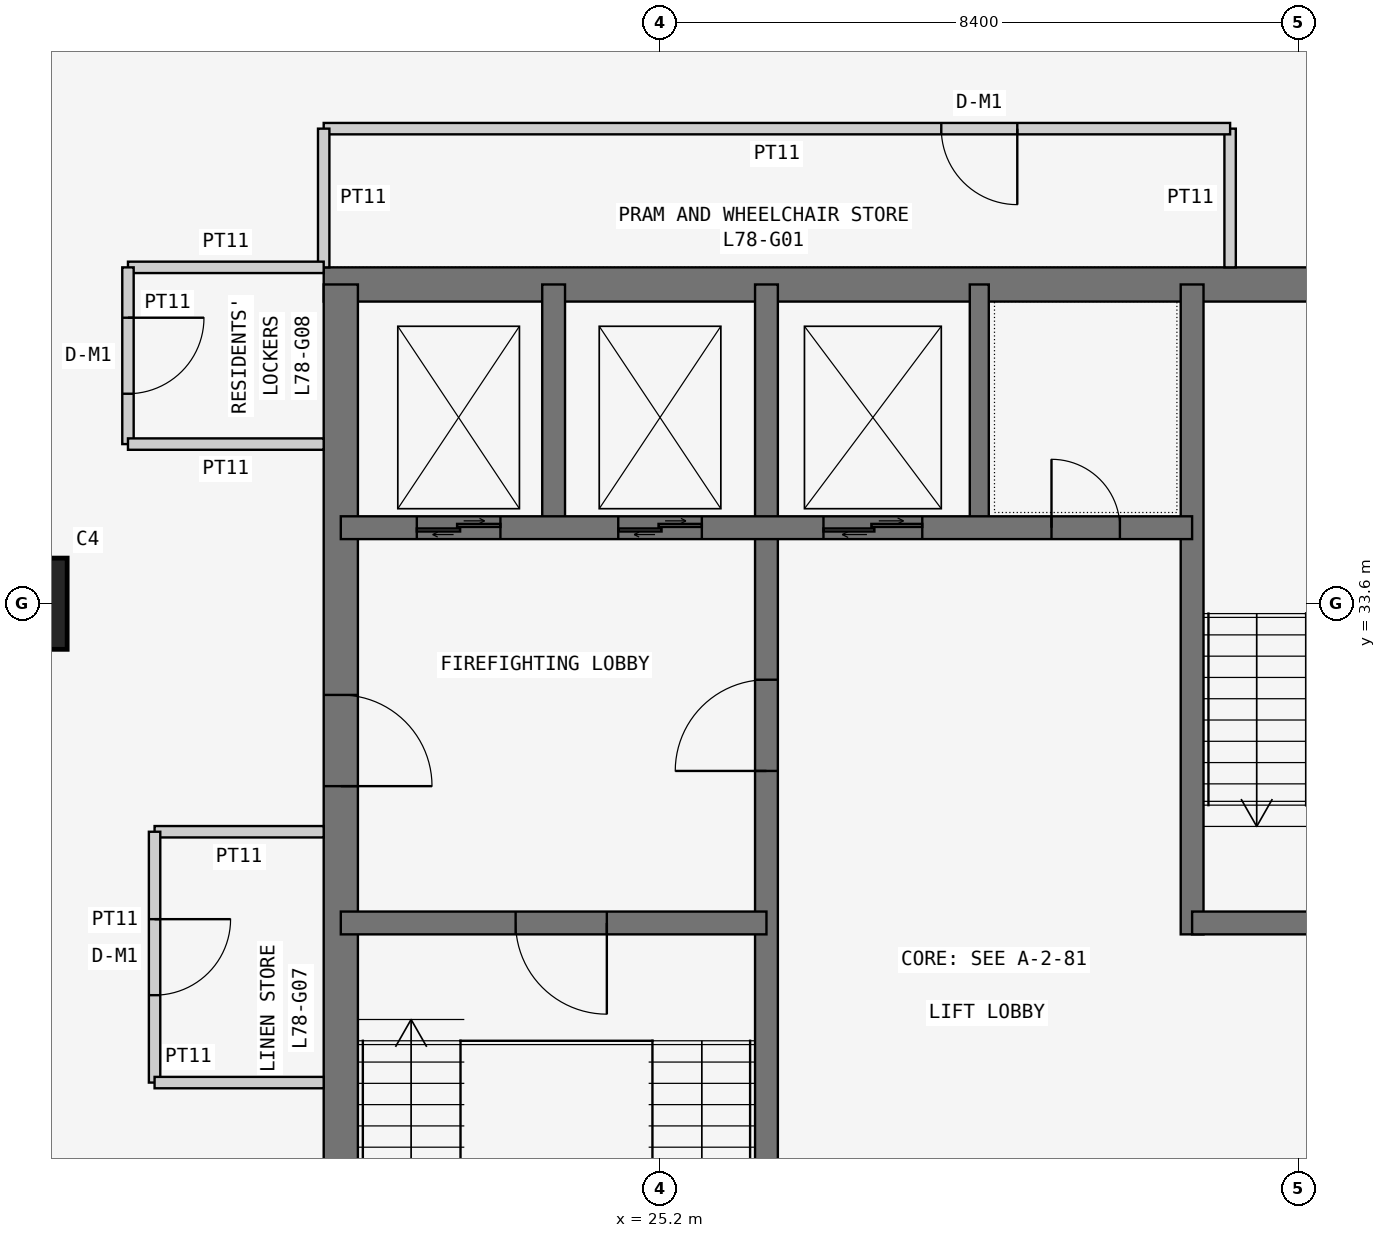
"""IFC4 building model, lengths in metres.
Left out: names, types, materials, properties, quantities, classifications, styles, units other than length and angle.
Written with IfcOpenShell. Run it as: python <this file> out.ifc"""

import sys

from ifc_helpers import new_model, si_unit, direction, frame, frame_2d, origin, origin_2d, place, context, subcontext, project, spatial, rectangle, extrude, element, fill, save


model = new_model("IFC4")
c1 = context("Model", 3, precision=1e-05, world=origin(), true_north=direction((0.0, 1.0)))
c2 = subcontext(c1, "Body", "Model", "MODEL_VIEW")
j1 = project(units=[si_unit("LENGTHUNIT", "METRE"), si_unit("PLANEANGLEUNIT", "RADIAN")], contexts=[c1])
p1 = place(None, origin())
s1 = spatial("IfcSite", under=j1, at=p1, CompositionType="ELEMENT")
p2 = place(p1, origin())
s2 = spatial("IfcBuilding", under=s1, at=p2, CompositionType="ELEMENT")
p3 = place(p2, frame((0.0, 0.0, 297.3)))
s3 = spatial("IfcBuildingStorey", under=s2, at=p3, CompositionType="ELEMENT", Elevation=297.3)
p4 = place(p3, frame((16.8, 33.6, 0.0), z_axis=(0.0, 0.0, 1.0), x_axis=(1.0, 0.0, 0.0)))
e1 = element("IfcColumn", 1, at=p4, inside=s3, PredefinedType="COLUMN", context=c2, shape_type="SweptSolid", body=[
    extrude(rectangle(XDim=1.2, YDim=1.2, at=origin_2d()), origin(), (0.0, 0.0, 1.0), 3.6),
])
p5 = place(p3, frame((37.8, 37.8, 0.0), z_axis=(0.0, 0.0, 1.0), x_axis=(-1.0, 0.0, 0.0)))
e2 = element("IfcWall", 2, at=p5, inside=s3, PredefinedType="SHEAR", context=c2, shape_type="SweptSolid", body=[
    extrude(rectangle(XDim=17.025, YDim=0.45, at=frame_2d((8.513, 0.0))), origin(), (0.0, 0.0, 1.0), 3.6),
])
p6 = place(p3, frame((21.0, 37.8, 0.0), z_axis=(0.0, 0.0, 1.0), x_axis=(0.0, -1.0, 0.0)))
e3 = element("IfcWall", 3, at=p6, inside=s3, PredefinedType="SHEAR", context=c2, shape_type="SweptSolid", body=[
    extrude(rectangle(XDim=17.025, YDim=0.45, at=frame_2d((8.513, 0.0))), origin(), (0.0, 0.0, 1.0), 3.6),
])
p7 = place(p6, frame((5.4, 0.0, 0.0)))
e4 = element("IfcOpeningElement", 4, at=p7, cuts=e3, PredefinedType="OPENING", context=c2, shape_type="SweptSolid", body=[
    extrude(rectangle(XDim=1.2, YDim=2.1, at=frame_2d((0.6, 1.05))), frame((0.0, 0.235, 0.0), z_axis=(0.0, -1.0, 0.0), x_axis=(1.0, 0.0, 0.0)), (0.0, 0.0, 1.0), 0.47),
])
p8 = place(p3, frame((26.6, 21.0, 0.0), z_axis=(0.0, 0.0, 1.0), x_axis=(0.0, 1.0, 0.0)))
e5 = element("IfcWall", 5, at=p8, inside=s3, PredefinedType="SHEAR", context=c2, shape_type="SweptSolid", body=[
    extrude(rectangle(XDim=16.8, YDim=0.3, at=frame_2d((8.4, 0.0))), origin(), (0.0, 0.0, 1.0), 3.6),
])
p9 = place(p8, frame((10.4, 0.0, 0.0)))
e6 = element("IfcOpeningElement", 6, at=p9, cuts=e5, PredefinedType="OPENING", context=c2, shape_type="SweptSolid", body=[
    extrude(rectangle(XDim=1.2, YDim=2.1, at=frame_2d((0.6, 1.05))), frame((0.0, 0.16, 0.0), z_axis=(0.0, -1.0, 0.0), x_axis=(1.0, 0.0, 0.0)), (0.0, 0.0, 1.0), 0.32),
])
p10 = place(p3, frame((21.0, 29.4, 0.0), z_axis=(0.0, 0.0, 1.0), x_axis=(1.0, 0.0, 0.0)))
e7 = element("IfcWall", 7, at=p10, inside=s3, PredefinedType="SHEAR", context=c2, shape_type="SweptSolid", body=[
    extrude(rectangle(XDim=5.6, YDim=0.3, at=frame_2d((2.8, 0.0))), origin(), (0.0, 0.0, 1.0), 3.6),
])
p11 = place(p10, frame((2.3, 0.0, 0.0)))
e8 = element("IfcOpeningElement", 8, at=p11, cuts=e7, PredefinedType="OPENING", context=c2, shape_type="SweptSolid", body=[
    extrude(rectangle(XDim=1.2, YDim=2.1, at=frame_2d((0.6, 1.05))), frame((0.0, 0.16, 0.0), z_axis=(0.0, -1.0, 0.0), x_axis=(1.0, 0.0, 0.0)), (0.0, 0.0, 1.0), 0.32),
])
p12 = place(p3, frame((21.0, 34.6, 0.0), z_axis=(0.0, 0.0, 1.0), x_axis=(1.0, 0.0, 0.0)))
e9 = element("IfcWall", 9, at=p12, inside=s3, PredefinedType="SHEAR", context=c2, shape_type="SweptSolid", body=[
    extrude(rectangle(XDim=11.2, YDim=0.3, at=frame_2d((5.6, 0.0))), origin(), (0.0, 0.0, 1.0), 3.6),
])
p13 = place(p12, frame((9.35, 0.0, 0.0)))
e10 = element("IfcOpeningElement", 10, at=p13, cuts=e9, PredefinedType="OPENING", context=c2, shape_type="SweptSolid", body=[
    extrude(rectangle(XDim=0.9, YDim=2.1, at=frame_2d((0.45, 1.05))), frame((0.0, 0.16, 0.0), z_axis=(0.0, -1.0, 0.0), x_axis=(1.0, 0.0, 0.0)), (0.0, 0.0, 1.0), 0.32),
])
p14 = place(p12, frame((1.0, 0.0, 0.0)))
e11 = element("IfcOpeningElement", 11, at=p14, cuts=e9, PredefinedType="OPENING", context=c2, shape_type="SweptSolid", body=[
    extrude(rectangle(XDim=1.1, YDim=2.1, at=frame_2d((0.55, 1.05))), frame((0.0, 0.16, 0.0), z_axis=(0.0, -1.0, 0.0), x_axis=(1.0, 0.0, 0.0)), (0.0, 0.0, 1.0), 0.32),
])
p15 = place(p12, frame((3.65, 0.0, 0.0)))
e12 = element("IfcOpeningElement", 12, at=p15, cuts=e9, PredefinedType="OPENING", context=c2, shape_type="SweptSolid", body=[
    extrude(rectangle(XDim=1.1, YDim=2.1, at=frame_2d((0.55, 1.05))), frame((0.0, 0.16, 0.0), z_axis=(0.0, -1.0, 0.0), x_axis=(1.0, 0.0, 0.0)), (0.0, 0.0, 1.0), 0.32),
])
p16 = place(p12, frame((6.35, 0.0, 0.0)))
e13 = element("IfcOpeningElement", 13, at=p16, cuts=e9, PredefinedType="OPENING", context=c2, shape_type="SweptSolid", body=[
    extrude(rectangle(XDim=1.3, YDim=2.1, at=frame_2d((0.65, 1.05))), frame((0.0, 0.16, 0.0), z_axis=(0.0, -1.0, 0.0), x_axis=(1.0, 0.0, 0.0)), (0.0, 0.0, 1.0), 0.32),
])
p17 = place(p3, frame((23.8, 34.6, 0.0), z_axis=(0.0, 0.0, 1.0), x_axis=(0.0, 1.0, 0.0)))
e14 = element("IfcWall", 14, at=p17, inside=s3, PredefinedType="SHEAR", context=c2, shape_type="SweptSolid", body=[
    extrude(rectangle(XDim=3.2, YDim=0.3, at=frame_2d((1.6, 0.0))), origin(), (0.0, 0.0, 1.0), 3.6),
])
p18 = place(p3, frame((32.2, 29.25, 0.0), z_axis=(0.0, 0.0, 1.0), x_axis=(0.0, 1.0, 0.0)))
e15 = element("IfcWall", 15, at=p18, inside=s3, PredefinedType="SHEAR", context=c2, shape_type="SweptSolid", body=[
    extrude(rectangle(XDim=8.55, YDim=0.3, at=frame_2d((4.275, 0.0))), origin(), (0.0, 0.0, 1.0), 3.6),
])
p19 = place(p3, frame((32.2, 29.4, 0.0), z_axis=(0.0, 0.0, 1.0), x_axis=(1.0, 0.0, 0.0)))
e16 = element("IfcWall", 16, at=p19, inside=s3, PredefinedType="SHEAR", context=c2, shape_type="SweptSolid", body=[
    extrude(rectangle(XDim=5.6, YDim=0.3, at=frame_2d((2.8, 0.0))), origin(), (0.0, 0.0, 1.0), 3.6),
])
p20 = place(p19, frame((2.0, 0.0, 0.0)))
e17 = element("IfcOpeningElement", 17, at=p20, cuts=e16, PredefinedType="OPENING", context=c2, shape_type="SweptSolid", body=[
    extrude(rectangle(XDim=1.2, YDim=2.1, at=frame_2d((0.6, 1.05))), frame((0.0, 0.16, 0.0), z_axis=(0.0, -1.0, 0.0), x_axis=(1.0, 0.0, 0.0)), (0.0, 0.0, 1.0), 0.32),
])
p21 = place(p3, frame((29.4, 34.6, 0.0), z_axis=(0.0, 0.0, 1.0), x_axis=(0.0, 1.0, 0.0)))
e18 = element("IfcWall", 18, at=p21, inside=s3, PredefinedType="SHEAR", context=c2, shape_type="SweptSolid", body=[
    extrude(rectangle(XDim=3.2, YDim=0.25, at=frame_2d((1.6, 0.0))), origin(), (0.0, 0.0, 1.0), 3.6),
])
p22 = place(p3, frame((32.7, 38.025, 0.0), z_axis=(0.0, 0.0, 1.0), x_axis=(0.0, 1.0, 0.0)))
e19 = element("IfcWall", 19, at=p22, inside=s3, PredefinedType="PARTITIONING", context=c2, shape_type="SweptSolid", body=[
    extrude(rectangle(XDim=1.825, YDim=0.15, at=frame_2d((0.913, 0.0))), origin(), (0.0, 0.0, 1.0), 3.35),
])
p23 = place(p3, frame((32.7, 39.85, 0.0), z_axis=(0.0, 0.0, 1.0), x_axis=(-1.0, 0.0, 0.0)))
e20 = element("IfcWall", 20, at=p23, inside=s3, PredefinedType="PARTITIONING", context=c2, shape_type="SweptSolid", body=[
    extrude(rectangle(XDim=11.925, YDim=0.15, at=frame_2d((5.962, 0.0))), origin(), (0.0, 0.0, 1.0), 3.35),
])
p24 = place(p23, frame((2.8, 0.0, 0.0)))
e21 = element("IfcOpeningElement", 21, at=p24, cuts=e20, PredefinedType="OPENING", context=c2, shape_type="SweptSolid", body=[
    extrude(rectangle(XDim=1.0, YDim=2.1, at=frame_2d((0.5, 1.05))), frame((0.0, 0.085, 0.0), z_axis=(0.0, -1.0, 0.0), x_axis=(1.0, 0.0, 0.0)), (0.0, 0.0, 1.0), 0.17),
])
p25 = place(p3, frame((20.775, 39.85, 0.0), z_axis=(0.0, 0.0, 1.0), x_axis=(0.0, -1.0, 0.0)))
e22 = element("IfcWall", 22, at=p25, inside=s3, PredefinedType="PARTITIONING", context=c2, shape_type="SweptSolid", body=[
    extrude(rectangle(XDim=1.825, YDim=0.15, at=frame_2d((0.913, 0.0))), origin(), (0.0, 0.0, 1.0), 3.35),
])
p26 = place(p3, frame((20.775, 30.6, 0.0), z_axis=(0.0, 0.0, 1.0), x_axis=(-1.0, 0.0, 0.0)))
e23 = element("IfcWall", 23, at=p26, inside=s3, PredefinedType="PARTITIONING", context=c2, shape_type="SweptSolid", body=[
    extrude(rectangle(XDim=2.225, YDim=0.15, at=frame_2d((1.112, 0.0))), origin(), (0.0, 0.0, 1.0), 3.35),
])
p27 = place(p3, frame((18.55, 30.6, 0.0), z_axis=(0.0, 0.0, 1.0), x_axis=(0.0, -1.0, 0.0)))
e24 = element("IfcWall", 24, at=p27, inside=s3, PredefinedType="PARTITIONING", context=c2, shape_type="SweptSolid", body=[
    extrude(rectangle(XDim=3.3, YDim=0.15, at=frame_2d((1.65, 0.0))), origin(), (0.0, 0.0, 1.0), 3.35),
])
p28 = place(p27, frame((1.15, 0.0, 0.0)))
e25 = element("IfcOpeningElement", 25, at=p28, cuts=e24, PredefinedType="OPENING", context=c2, shape_type="SweptSolid", body=[
    extrude(rectangle(XDim=1.0, YDim=2.1, at=frame_2d((0.5, 1.05))), frame((0.0, 0.085, 0.0), z_axis=(0.0, -1.0, 0.0), x_axis=(1.0, 0.0, 0.0)), (0.0, 0.0, 1.0), 0.17),
])
p29 = place(p3, frame((18.55, 27.3, 0.0), z_axis=(0.0, 0.0, 1.0), x_axis=(1.0, 0.0, 0.0)))
e26 = element("IfcWall", 26, at=p29, inside=s3, PredefinedType="PARTITIONING", context=c2, shape_type="SweptSolid", body=[
    extrude(rectangle(XDim=2.225, YDim=0.15, at=frame_2d((1.112, 0.0))), origin(), (0.0, 0.0, 1.0), 3.35),
])
p30 = place(p3, frame((20.775, 38.025, 0.0), z_axis=(0.0, 0.0, 1.0), x_axis=(-1.0, 0.0, 0.0)))
e27 = element("IfcWall", 27, at=p30, inside=s3, PredefinedType="PARTITIONING", context=c2, shape_type="SweptSolid", body=[
    extrude(rectangle(XDim=2.575, YDim=0.15, at=frame_2d((1.288, 0.0))), origin(), (0.0, 0.0, 1.0), 3.35),
])
p31 = place(p3, frame((18.2, 38.025, 0.0), z_axis=(0.0, 0.0, 1.0), x_axis=(0.0, -1.0, 0.0)))
e28 = element("IfcWall", 28, at=p31, inside=s3, PredefinedType="PARTITIONING", context=c2, shape_type="SweptSolid", body=[
    extrude(rectangle(XDim=2.325, YDim=0.15, at=frame_2d((1.163, 0.0))), origin(), (0.0, 0.0, 1.0), 3.35),
])
p32 = place(p31, frame((0.663, 0.0, 0.0)))
e29 = element("IfcOpeningElement", 29, at=p32, cuts=e28, PredefinedType="OPENING", context=c2, shape_type="SweptSolid", body=[
    extrude(rectangle(XDim=1.0, YDim=2.1, at=frame_2d((0.5, 1.05))), frame((0.0, 0.085, 0.0), z_axis=(0.0, -1.0, 0.0), x_axis=(1.0, 0.0, 0.0)), (0.0, 0.0, 1.0), 0.17),
])
p33 = place(p3, frame((18.2, 35.7, 0.0), z_axis=(0.0, 0.0, 1.0), x_axis=(1.0, 0.0, 0.0)))
e30 = element("IfcWall", 30, at=p33, inside=s3, PredefinedType="PARTITIONING", context=c2, shape_type="SweptSolid", body=[
    extrude(rectangle(XDim=2.575, YDim=0.15, at=frame_2d((1.288, 0.0))), origin(), (0.0, 0.0, 1.0), 3.35),
])
p34 = place(p24, origin())
e31 = element("IfcDoor", 31, at=p34, inside=s3, OperationType="SINGLE_SWING_LEFT", PredefinedType="DOOR", context=c2, shape_type="SweptSolid", body=[
    extrude(rectangle(XDim=1.0, YDim=2.1, at=frame_2d((0.5, 1.05))), frame((0.0, 0.025, 0.0), z_axis=(0.0, -1.0, 0.0), x_axis=(1.0, 0.0, 0.0)), (0.0, 0.0, 1.0), 0.05),
])
fill(e21, e31)
p35 = place(p28, origin())
e32 = element("IfcDoor", 32, at=p35, inside=s3, OperationType="SINGLE_SWING_LEFT", PredefinedType="DOOR", context=c2, shape_type="SweptSolid", body=[
    extrude(rectangle(XDim=1.0, YDim=2.1, at=frame_2d((0.5, 1.05))), frame((0.0, 0.025, 0.0), z_axis=(0.0, -1.0, 0.0), x_axis=(1.0, 0.0, 0.0)), (0.0, 0.0, 1.0), 0.05),
])
fill(e25, e32)
p36 = place(p32, origin())
e33 = element("IfcDoor", 33, at=p36, inside=s3, OperationType="SINGLE_SWING_LEFT", PredefinedType="DOOR", context=c2, shape_type="SweptSolid", body=[
    extrude(rectangle(XDim=1.0, YDim=2.1, at=frame_2d((0.5, 1.05))), frame((0.0, 0.025, 0.0), z_axis=(0.0, -1.0, 0.0), x_axis=(1.0, 0.0, 0.0)), (0.0, 0.0, 1.0), 0.05),
])
fill(e29, e33)
p37 = place(p7, origin())
e34 = element("IfcDoor", 34, at=p37, inside=s3, OperationType="SINGLE_SWING_RIGHT", PredefinedType="DOOR", context=c2, shape_type="SweptSolid", body=[
    extrude(rectangle(XDim=1.2, YDim=2.1, at=frame_2d((0.6, 1.05))), frame((0.0, 0.025, 0.0), z_axis=(0.0, -1.0, 0.0), x_axis=(1.0, 0.0, 0.0)), (0.0, 0.0, 1.0), 0.05),
])
fill(e4, e34)
p38 = place(p11, frame((1.2, 0.0, 0.0), z_axis=(0.0, 0.0, 1.0), x_axis=(-1.0, 0.0, 0.0)))
e35 = element("IfcDoor", 35, at=p38, inside=s3, OperationType="SINGLE_SWING_LEFT", PredefinedType="DOOR", context=c2, shape_type="SweptSolid", body=[
    extrude(rectangle(XDim=1.2, YDim=2.1, at=frame_2d((0.6, 1.05))), frame((0.0, 0.025, 0.0), z_axis=(0.0, -1.0, 0.0), x_axis=(1.0, 0.0, 0.0)), (0.0, 0.0, 1.0), 0.05),
])
fill(e8, e35)
p39 = place(p9, origin())
e36 = element("IfcDoor", 36, at=p39, inside=s3, OperationType="SINGLE_SWING_LEFT", PredefinedType="DOOR", context=c2, shape_type="SweptSolid", body=[
    extrude(rectangle(XDim=1.2, YDim=2.1, at=frame_2d((0.6, 1.05))), frame((0.0, 0.025, 0.0), z_axis=(0.0, -1.0, 0.0), x_axis=(1.0, 0.0, 0.0)), (0.0, 0.0, 1.0), 0.05),
])
fill(e6, e36)
p40 = place(p13, origin())
e37 = element("IfcDoor", 37, at=p40, inside=s3, OperationType="SINGLE_SWING_LEFT", PredefinedType="DOOR", context=c2, shape_type="SweptSolid", body=[
    extrude(rectangle(XDim=0.9, YDim=2.1, at=frame_2d((0.45, 1.05))), frame((0.0, 0.025, 0.0), z_axis=(0.0, -1.0, 0.0), x_axis=(1.0, 0.0, 0.0)), (0.0, 0.0, 1.0), 0.05),
])
fill(e10, e37)
p41 = place(p14, origin())
e38 = element("IfcDoor", 38, at=p41, inside=s3, OperationType="DOUBLE_DOOR_SLIDING", PredefinedType="DOOR", context=c2, shape_type="SweptSolid", body=[
    extrude(rectangle(XDim=1.1, YDim=2.1, at=frame_2d((0.55, 1.05))), frame((0.0, 0.025, 0.0), z_axis=(0.0, -1.0, 0.0), x_axis=(1.0, 0.0, 0.0)), (0.0, 0.0, 1.0), 0.05),
])
fill(e11, e38)
p42 = place(p15, origin())
e39 = element("IfcDoor", 39, at=p42, inside=s3, OperationType="DOUBLE_DOOR_SLIDING", PredefinedType="DOOR", context=c2, shape_type="SweptSolid", body=[
    extrude(rectangle(XDim=1.1, YDim=2.1, at=frame_2d((0.55, 1.05))), frame((0.0, 0.025, 0.0), z_axis=(0.0, -1.0, 0.0), x_axis=(1.0, 0.0, 0.0)), (0.0, 0.0, 1.0), 0.05),
])
fill(e12, e39)
p43 = place(p16, origin())
e40 = element("IfcDoor", 40, at=p43, inside=s3, OperationType="DOUBLE_DOOR_SLIDING", PredefinedType="DOOR", context=c2, shape_type="SweptSolid", body=[
    extrude(rectangle(XDim=1.3, YDim=2.1, at=frame_2d((0.65, 1.05))), frame((0.0, 0.025, 0.0), z_axis=(0.0, -1.0, 0.0), x_axis=(1.0, 0.0, 0.0)), (0.0, 0.0, 1.0), 0.05),
])
fill(e13, e40)
save(model, sys.argv[1])
